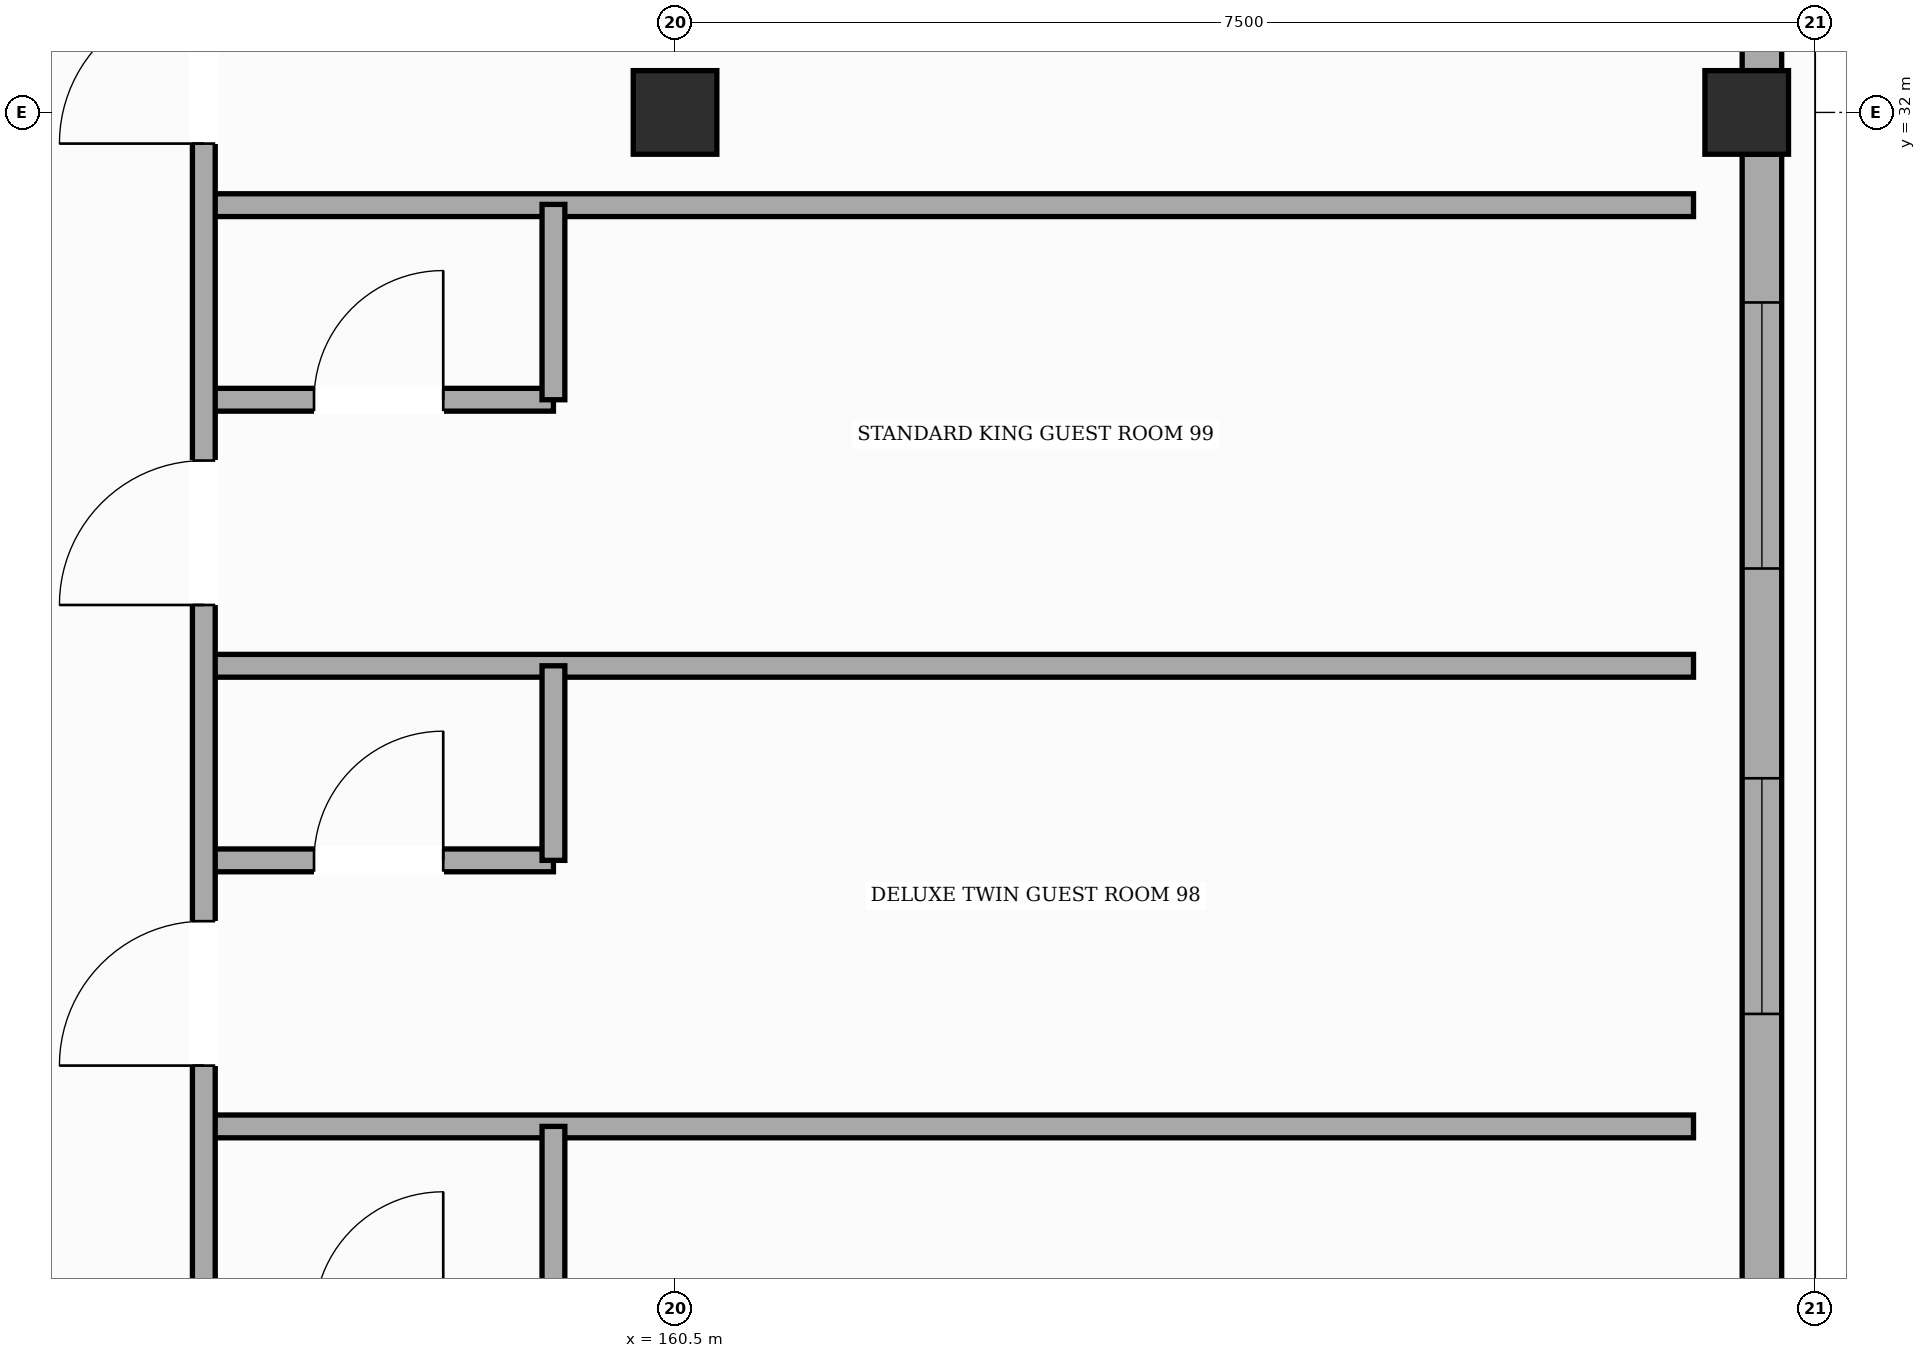
"""IFC4 building model, lengths in metres.
Left out: names, types, materials, properties, quantities, classifications, styles, units other than length and angle.
Written with IfcOpenShell. Run it as: python <this file> out.ifc"""

import sys

from ifc_helpers import new_model, si_unit, direction, frame, frame_2d, origin, origin_2d, place, context, subcontext, project, spatial, rectangle, hollow_rectangle, extrude, element, fill, save


model = new_model("IFC4")
c1 = context("Model", 3, precision=1e-05, world=origin(), true_north=direction((0.0, 1.0)))
c2 = subcontext(c1, "Body", "Model", "MODEL_VIEW")
j1 = project(units=[si_unit("LENGTHUNIT", "METRE"), si_unit("PLANEANGLEUNIT", "RADIAN")], contexts=[c1])
p1 = place(None, origin())
s1 = spatial("IfcSite", under=j1, at=p1, CompositionType="ELEMENT")
p2 = place(p1, origin())
s2 = spatial("IfcBuilding", under=s1, at=p2, CompositionType="ELEMENT")
p3 = place(p2, frame((0.0, 0.0, 24.6)))
s3 = spatial("IfcBuildingStorey", under=s2, at=p3, CompositionType="ELEMENT", Elevation=24.6)
for number, where, z_axis, x_axis in (
    (1, (160.5, 32.0, 0.0), (0.0, 0.0, 1.0), (1.0, 0.0, 0.0)),
    (2, (167.55, 32.0, 0.0), (0.0, 0.0, 1.0), (1.0, 0.0, 0.0)),
):
    element("IfcColumn", number, at=place(p3, frame(where, z_axis=z_axis, x_axis=x_axis)), inside=s3, PredefinedType="COLUMN", context=c2, shape_type="SweptSolid", body=[
        extrude(hollow_rectangle(XDim=0.55, YDim=0.55, WallThickness=0.022, InnerFilletRadius=0.022, OuterFilletRadius=0.044, at=origin_2d()), origin(), (0.0, 0.0, 1.0), 3.6),
    ])
p4 = place(p3, frame((167.65, 31.725, 0.0), z_axis=(0.0, 0.0, 1.0), x_axis=(0.0, -1.0, 0.0)))
e3 = element("IfcWall", 3, at=p4, inside=s3, PredefinedType="SOLIDWALL", context=c2, shape_type="SweptSolid", body=[
    extrude(rectangle(XDim=7.45, YDim=0.26, at=frame_2d((3.725, 0.0))), origin(), (0.0, 0.0, 1.0), 2.755),
])
p5 = place(p4, frame((4.105, 0.0, 0.85)))
e4 = element("IfcOpeningElement", 4, at=p5, cuts=e3, PredefinedType="OPENING", context=c2, shape_type="SweptSolid", body=[
    extrude(rectangle(XDim=1.55, YDim=1.35, at=frame_2d((0.775, 0.675))), frame((0.0, 0.14, 0.0), z_axis=(0.0, -1.0, 0.0), x_axis=(1.0, 0.0, 0.0)), (0.0, 0.0, 1.0), 0.28),
])
p6 = place(p4, frame((0.975, 0.0, 0.85)))
e5 = element("IfcOpeningElement", 5, at=p6, cuts=e3, PredefinedType="OPENING", context=c2, shape_type="SweptSolid", body=[
    extrude(rectangle(XDim=1.75, YDim=1.35, at=frame_2d((0.875, 0.675))), frame((0.0, 0.14, 0.0), z_axis=(0.0, -1.0, 0.0), x_axis=(1.0, 0.0, 0.0)), (0.0, 0.0, 1.0), 0.28),
])
p7 = place(p3, frame((167.65, 40.625, 0.0), z_axis=(0.0, 0.0, 1.0), x_axis=(0.0, -1.0, 0.0)))
e6 = element("IfcWall", 6, at=p7, inside=s3, PredefinedType="SOLIDWALL", context=c2, shape_type="SweptSolid", body=[
    extrude(rectangle(XDim=8.35, YDim=0.26, at=frame_2d((4.175, 0.0))), origin(), (0.0, 0.0, 1.0), 2.755),
])
p8 = place(p7, frame((6.85, 0.0, 0.85)))
e7 = element("IfcOpeningElement", 7, at=p8, cuts=e6, PredefinedType="OPENING", context=c2, shape_type="SweptSolid", body=[
    extrude(rectangle(XDim=0.85, YDim=1.35, at=frame_2d((0.425, 0.675))), frame((0.0, 0.14, 0.0), z_axis=(0.0, -1.0, 0.0), x_axis=(1.0, 0.0, 0.0)), (0.0, 0.0, 1.0), 0.28),
])
p9 = place(p7, frame((3.56, 0.0, 0.85)))
e8 = element("IfcOpeningElement", 8, at=p9, cuts=e6, PredefinedType="OPENING", context=c2, shape_type="SweptSolid", body=[
    extrude(rectangle(XDim=2.25, YDim=1.35, at=frame_2d((1.125, 0.675))), frame((0.0, 0.14, 0.0), z_axis=(0.0, -1.0, 0.0), x_axis=(1.0, 0.0, 0.0)), (0.0, 0.0, 1.0), 0.28),
])
p10 = place(p7, frame((1.03, 0.0, 0.85)))
e9 = element("IfcOpeningElement", 9, at=p10, cuts=e6, PredefinedType="OPENING", context=c2, shape_type="SweptSolid", body=[
    extrude(rectangle(XDim=1.25, YDim=1.35, at=frame_2d((0.625, 0.675))), frame((0.0, 0.14, 0.0), z_axis=(0.0, -1.0, 0.0), x_axis=(1.0, 0.0, 0.0)), (0.0, 0.0, 1.0), 0.28),
])
p11 = place(p3, frame((157.4, 25.33, 0.0), z_axis=(0.0, 0.0, 1.0), x_axis=(1.0, 0.0, 0.0)))
e10 = element("IfcWall", 10, at=p11, inside=s3, PredefinedType="PARTITIONING", context=c2, shape_type="SweptSolid", body=[
    extrude(rectangle(XDim=9.8, YDim=0.15, at=frame_2d((4.9, 0.0))), origin(), (0.0, 0.0, 1.0), 3.365),
])
p12 = place(p3, frame((157.4, 27.08, 0.0), z_axis=(0.0, 0.0, 1.0), x_axis=(1.0, 0.0, 0.0)))
e11 = element("IfcWall", 11, at=p12, inside=s3, PredefinedType="PARTITIONING", context=c2, shape_type="SweptSolid", body=[
    extrude(rectangle(XDim=2.3, YDim=0.15, at=frame_2d((1.15, 0.0))), origin(), (0.0, 0.0, 1.0), 3.365),
])
p13 = place(p12, frame((0.725, 0.0, 0.0)))
e12 = element("IfcOpeningElement", 12, at=p13, cuts=e11, PredefinedType="OPENING", context=c2, shape_type="SweptSolid", body=[
    extrude(rectangle(XDim=0.85, YDim=2.1, at=frame_2d((0.425, 1.05))), frame((0.0, 0.085, 0.0), z_axis=(0.0, -1.0, 0.0), x_axis=(1.0, 0.0, 0.0)), (0.0, 0.0, 1.0), 0.17),
])
p14 = place(p3, frame((157.4, 28.36, 0.0), z_axis=(0.0, 0.0, 1.0), x_axis=(1.0, 0.0, 0.0)))
e13 = element("IfcWall", 13, at=p14, inside=s3, PredefinedType="PARTITIONING", context=c2, shape_type="SweptSolid", body=[
    extrude(rectangle(XDim=9.8, YDim=0.15, at=frame_2d((4.9, 0.0))), origin(), (0.0, 0.0, 1.0), 3.365),
])
p15 = place(p3, frame((157.4, 30.11, 0.0), z_axis=(0.0, 0.0, 1.0), x_axis=(1.0, 0.0, 0.0)))
e14 = element("IfcWall", 14, at=p15, inside=s3, PredefinedType="PARTITIONING", context=c2, shape_type="SweptSolid", body=[
    extrude(rectangle(XDim=2.3, YDim=0.15, at=frame_2d((1.15, 0.0))), origin(), (0.0, 0.0, 1.0), 3.365),
])
p16 = place(p15, frame((0.725, 0.0, 0.0)))
e15 = element("IfcOpeningElement", 15, at=p16, cuts=e14, PredefinedType="OPENING", context=c2, shape_type="SweptSolid", body=[
    extrude(rectangle(XDim=0.85, YDim=2.1, at=frame_2d((0.425, 1.05))), frame((0.0, 0.085, 0.0), z_axis=(0.0, -1.0, 0.0), x_axis=(1.0, 0.0, 0.0)), (0.0, 0.0, 1.0), 0.17),
])
p17 = place(p3, frame((157.4, 31.39, 0.0), z_axis=(0.0, 0.0, 1.0), x_axis=(1.0, 0.0, 0.0)))
e16 = element("IfcWall", 16, at=p17, inside=s3, PredefinedType="PARTITIONING", context=c2, shape_type="SweptSolid", body=[
    extrude(rectangle(XDim=9.8, YDim=0.15, at=frame_2d((4.9, 0.0))), origin(), (0.0, 0.0, 1.0), 3.365),
])
p18 = place(p3, frame((157.4, 22.3, 0.0), z_axis=(0.0, 0.0, 1.0), x_axis=(0.0, 1.0, 0.0)))
e17 = element("IfcWall", 17, at=p18, inside=s3, PredefinedType="PARTITIONING", context=c2, shape_type="SweptSolid", body=[
    extrude(rectangle(XDim=48.5, YDim=0.15, at=frame_2d((24.25, 0.0))), origin(), (0.0, 0.0, 1.0), 3.365),
])
p19 = place(p18, frame((0.4, 0.0, 0.0)))
e18 = element("IfcOpeningElement", 18, at=p19, cuts=e17, PredefinedType="OPENING", context=c2, shape_type="SweptSolid", body=[
    extrude(rectangle(XDim=0.95, YDim=2.15, at=frame_2d((0.475, 1.075))), frame((0.0, 0.085, 0.0), z_axis=(0.0, -1.0, 0.0), x_axis=(1.0, 0.0, 0.0)), (0.0, 0.0, 1.0), 0.17),
])
p20 = place(p18, frame((3.43, 0.0, 0.0)))
e19 = element("IfcOpeningElement", 19, at=p20, cuts=e17, PredefinedType="OPENING", context=c2, shape_type="SweptSolid", body=[
    extrude(rectangle(XDim=0.95, YDim=2.15, at=frame_2d((0.475, 1.075))), frame((0.0, 0.085, 0.0), z_axis=(0.0, -1.0, 0.0), x_axis=(1.0, 0.0, 0.0)), (0.0, 0.0, 1.0), 0.17),
])
p21 = place(p18, frame((6.46, 0.0, 0.0)))
e20 = element("IfcOpeningElement", 20, at=p21, cuts=e17, PredefinedType="OPENING", context=c2, shape_type="SweptSolid", body=[
    extrude(rectangle(XDim=0.95, YDim=2.15, at=frame_2d((0.475, 1.075))), frame((0.0, 0.085, 0.0), z_axis=(0.0, -1.0, 0.0), x_axis=(1.0, 0.0, 0.0)), (0.0, 0.0, 1.0), 0.17),
])
p22 = place(p18, frame((9.495, 0.0, 0.0)))
e21 = element("IfcOpeningElement", 21, at=p22, cuts=e17, PredefinedType="OPENING", context=c2, shape_type="SweptSolid", body=[
    extrude(rectangle(XDim=0.95, YDim=2.15, at=frame_2d((0.475, 1.075))), frame((0.0, 0.085, 0.0), z_axis=(0.0, -1.0, 0.0), x_axis=(1.0, 0.0, 0.0)), (0.0, 0.0, 1.0), 0.17),
])
p23 = place(p18, frame((12.525, 0.0, 0.0)))
e22 = element("IfcOpeningElement", 22, at=p23, cuts=e17, PredefinedType="OPENING", context=c2, shape_type="SweptSolid", body=[
    extrude(rectangle(XDim=0.95, YDim=2.15, at=frame_2d((0.475, 1.075))), frame((0.0, 0.085, 0.0), z_axis=(0.0, -1.0, 0.0), x_axis=(1.0, 0.0, 0.0)), (0.0, 0.0, 1.0), 0.17),
])
p24 = place(p18, frame((15.555, 0.0, 0.0)))
e23 = element("IfcOpeningElement", 23, at=p24, cuts=e17, PredefinedType="OPENING", context=c2, shape_type="SweptSolid", body=[
    extrude(rectangle(XDim=0.95, YDim=2.15, at=frame_2d((0.475, 1.075))), frame((0.0, 0.085, 0.0), z_axis=(0.0, -1.0, 0.0), x_axis=(1.0, 0.0, 0.0)), (0.0, 0.0, 1.0), 0.17),
])
p25 = place(p18, frame((18.585, 0.0, 0.0)))
e24 = element("IfcOpeningElement", 24, at=p25, cuts=e17, PredefinedType="OPENING", context=c2, shape_type="SweptSolid", body=[
    extrude(rectangle(XDim=0.95, YDim=2.15, at=frame_2d((0.475, 1.075))), frame((0.0, 0.085, 0.0), z_axis=(0.0, -1.0, 0.0), x_axis=(1.0, 0.0, 0.0)), (0.0, 0.0, 1.0), 0.17),
])
p26 = place(p18, frame((21.62, 0.0, 0.0)))
e25 = element("IfcOpeningElement", 25, at=p26, cuts=e17, PredefinedType="OPENING", context=c2, shape_type="SweptSolid", body=[
    extrude(rectangle(XDim=0.95, YDim=2.15, at=frame_2d((0.475, 1.075))), frame((0.0, 0.085, 0.0), z_axis=(0.0, -1.0, 0.0), x_axis=(1.0, 0.0, 0.0)), (0.0, 0.0, 1.0), 0.17),
])
p27 = place(p18, frame((24.65, 0.0, 0.0)))
e26 = element("IfcOpeningElement", 26, at=p27, cuts=e17, PredefinedType="OPENING", context=c2, shape_type="SweptSolid", body=[
    extrude(rectangle(XDim=0.95, YDim=2.15, at=frame_2d((0.475, 1.075))), frame((0.0, 0.085, 0.0), z_axis=(0.0, -1.0, 0.0), x_axis=(1.0, 0.0, 0.0)), (0.0, 0.0, 1.0), 0.17),
])
p28 = place(p18, frame((27.68, 0.0, 0.0)))
e27 = element("IfcOpeningElement", 27, at=p28, cuts=e17, PredefinedType="OPENING", context=c2, shape_type="SweptSolid", body=[
    extrude(rectangle(XDim=0.95, YDim=2.15, at=frame_2d((0.475, 1.075))), frame((0.0, 0.085, 0.0), z_axis=(0.0, -1.0, 0.0), x_axis=(1.0, 0.0, 0.0)), (0.0, 0.0, 1.0), 0.17),
])
p29 = place(p18, frame((30.71, 0.0, 0.0)))
e28 = element("IfcOpeningElement", 28, at=p29, cuts=e17, PredefinedType="OPENING", context=c2, shape_type="SweptSolid", body=[
    extrude(rectangle(XDim=0.95, YDim=2.15, at=frame_2d((0.475, 1.075))), frame((0.0, 0.085, 0.0), z_axis=(0.0, -1.0, 0.0), x_axis=(1.0, 0.0, 0.0)), (0.0, 0.0, 1.0), 0.17),
])
p30 = place(p18, frame((33.745, 0.0, 0.0)))
e29 = element("IfcOpeningElement", 29, at=p30, cuts=e17, PredefinedType="OPENING", context=c2, shape_type="SweptSolid", body=[
    extrude(rectangle(XDim=0.95, YDim=2.15, at=frame_2d((0.475, 1.075))), frame((0.0, 0.085, 0.0), z_axis=(0.0, -1.0, 0.0), x_axis=(1.0, 0.0, 0.0)), (0.0, 0.0, 1.0), 0.17),
])
p31 = place(p18, frame((36.775, 0.0, 0.0)))
e30 = element("IfcOpeningElement", 30, at=p31, cuts=e17, PredefinedType="OPENING", context=c2, shape_type="SweptSolid", body=[
    extrude(rectangle(XDim=0.95, YDim=2.15, at=frame_2d((0.475, 1.075))), frame((0.0, 0.085, 0.0), z_axis=(0.0, -1.0, 0.0), x_axis=(1.0, 0.0, 0.0)), (0.0, 0.0, 1.0), 0.17),
])
p32 = place(p18, frame((39.805, 0.0, 0.0)))
e31 = element("IfcOpeningElement", 31, at=p32, cuts=e17, PredefinedType="OPENING", context=c2, shape_type="SweptSolid", body=[
    extrude(rectangle(XDim=0.95, YDim=2.15, at=frame_2d((0.475, 1.075))), frame((0.0, 0.085, 0.0), z_axis=(0.0, -1.0, 0.0), x_axis=(1.0, 0.0, 0.0)), (0.0, 0.0, 1.0), 0.17),
])
p33 = place(p18, frame((42.84, 0.0, 0.0)))
e32 = element("IfcOpeningElement", 32, at=p33, cuts=e17, PredefinedType="OPENING", context=c2, shape_type="SweptSolid", body=[
    extrude(rectangle(XDim=0.95, YDim=2.15, at=frame_2d((0.475, 1.075))), frame((0.0, 0.085, 0.0), z_axis=(0.0, -1.0, 0.0), x_axis=(1.0, 0.0, 0.0)), (0.0, 0.0, 1.0), 0.17),
])
p34 = place(p18, frame((45.87, 0.0, 0.0)))
e33 = element("IfcOpeningElement", 33, at=p34, cuts=e17, PredefinedType="OPENING", context=c2, shape_type="SweptSolid", body=[
    extrude(rectangle(XDim=0.95, YDim=2.15, at=frame_2d((0.475, 1.075))), frame((0.0, 0.085, 0.0), z_axis=(0.0, -1.0, 0.0), x_axis=(1.0, 0.0, 0.0)), (0.0, 0.0, 1.0), 0.17),
])
for number, where, z_axis, x_axis in (
    (34, (159.7, 24.05, 0.0), (0.0, 0.0, 1.0), (0.0, 1.0, 0.0)),
    (35, (159.7, 27.08, 0.0), (0.0, 0.0, 1.0), (0.0, 1.0, 0.0)),
):
    element("IfcWall", number, at=place(p3, frame(where, z_axis=z_axis, x_axis=x_axis)), inside=s3, PredefinedType="PARTITIONING", context=c2, shape_type="SweptSolid", body=[
        extrude(rectangle(XDim=1.28, YDim=0.15, at=frame_2d((0.64, 0.0))), origin(), (0.0, 0.0, 1.0), 3.365),
    ])
p35 = place(p3, frame((159.7, 30.11, 0.0), z_axis=(0.0, 0.0, 1.0), x_axis=(0.0, 1.0, 0.0)))
e36 = element("IfcWall", 36, at=p35, inside=s3, PredefinedType="PARTITIONING", context=c2, shape_type="SweptSolid", body=[
    extrude(rectangle(XDim=1.285, YDim=0.15, at=frame_2d((0.643, 0.0))), origin(), (0.0, 0.0, 1.0), 3.365),
])
p36 = place(p5, origin())
e37 = element("IfcWindow", 37, at=p36, inside=s3, PartitioningType="SINGLE_PANEL", PredefinedType="WINDOW", context=c2, shape_type="SweptSolid", body=[
    extrude(rectangle(XDim=1.55, YDim=1.35, at=frame_2d((0.775, 0.675))), frame((0.0, 0.03, 0.0), z_axis=(0.0, -1.0, 0.0), x_axis=(1.0, 0.0, 0.0)), (0.0, 0.0, 1.0), 0.06),
])
fill(e4, e37)
p37 = place(p6, origin())
e38 = element("IfcWindow", 38, at=p37, inside=s3, PartitioningType="SINGLE_PANEL", PredefinedType="WINDOW", context=c2, shape_type="SweptSolid", body=[
    extrude(rectangle(XDim=1.75, YDim=1.35, at=frame_2d((0.875, 0.675))), frame((0.0, 0.03, 0.0), z_axis=(0.0, -1.0, 0.0), x_axis=(1.0, 0.0, 0.0)), (0.0, 0.0, 1.0), 0.06),
])
fill(e5, e38)
p38 = place(p20, origin())
e39 = element("IfcDoor", 39, at=p38, inside=s3, OperationType="SINGLE_SWING_LEFT", PredefinedType="DOOR", context=c2, shape_type="SweptSolid", body=[
    extrude(rectangle(XDim=0.95, YDim=2.15, at=frame_2d((0.475, 1.075))), frame((0.0, 0.025, 0.0), z_axis=(0.0, -1.0, 0.0), x_axis=(1.0, 0.0, 0.0)), (0.0, 0.0, 1.0), 0.05),
])
fill(e19, e39)
p39 = place(p13, origin())
e40 = element("IfcDoor", 40, at=p39, inside=s3, OperationType="SINGLE_SWING_RIGHT", PredefinedType="DOOR", context=c2, shape_type="SweptSolid", body=[
    extrude(rectangle(XDim=0.85, YDim=2.1, at=frame_2d((0.425, 1.05))), frame((0.0, 0.025, 0.0), z_axis=(0.0, -1.0, 0.0), x_axis=(1.0, 0.0, 0.0)), (0.0, 0.0, 1.0), 0.05),
])
fill(e12, e40)
p40 = place(p21, origin())
e41 = element("IfcDoor", 41, at=p40, inside=s3, OperationType="SINGLE_SWING_LEFT", PredefinedType="DOOR", context=c2, shape_type="SweptSolid", body=[
    extrude(rectangle(XDim=0.95, YDim=2.15, at=frame_2d((0.475, 1.075))), frame((0.0, 0.025, 0.0), z_axis=(0.0, -1.0, 0.0), x_axis=(1.0, 0.0, 0.0)), (0.0, 0.0, 1.0), 0.05),
])
fill(e20, e41)
p41 = place(p16, origin())
e42 = element("IfcDoor", 42, at=p41, inside=s3, OperationType="SINGLE_SWING_RIGHT", PredefinedType="DOOR", context=c2, shape_type="SweptSolid", body=[
    extrude(rectangle(XDim=0.85, YDim=2.1, at=frame_2d((0.425, 1.05))), frame((0.0, 0.025, 0.0), z_axis=(0.0, -1.0, 0.0), x_axis=(1.0, 0.0, 0.0)), (0.0, 0.0, 1.0), 0.05),
])
fill(e15, e42)
p42 = place(p22, origin())
e43 = element("IfcDoor", 43, at=p42, inside=s3, OperationType="SINGLE_SWING_LEFT", PredefinedType="DOOR", context=c2, shape_type="SweptSolid", body=[
    extrude(rectangle(XDim=0.95, YDim=2.15, at=frame_2d((0.475, 1.075))), frame((0.0, 0.025, 0.0), z_axis=(0.0, -1.0, 0.0), x_axis=(1.0, 0.0, 0.0)), (0.0, 0.0, 1.0), 0.05),
])
fill(e21, e43)
save(model, sys.argv[1])
